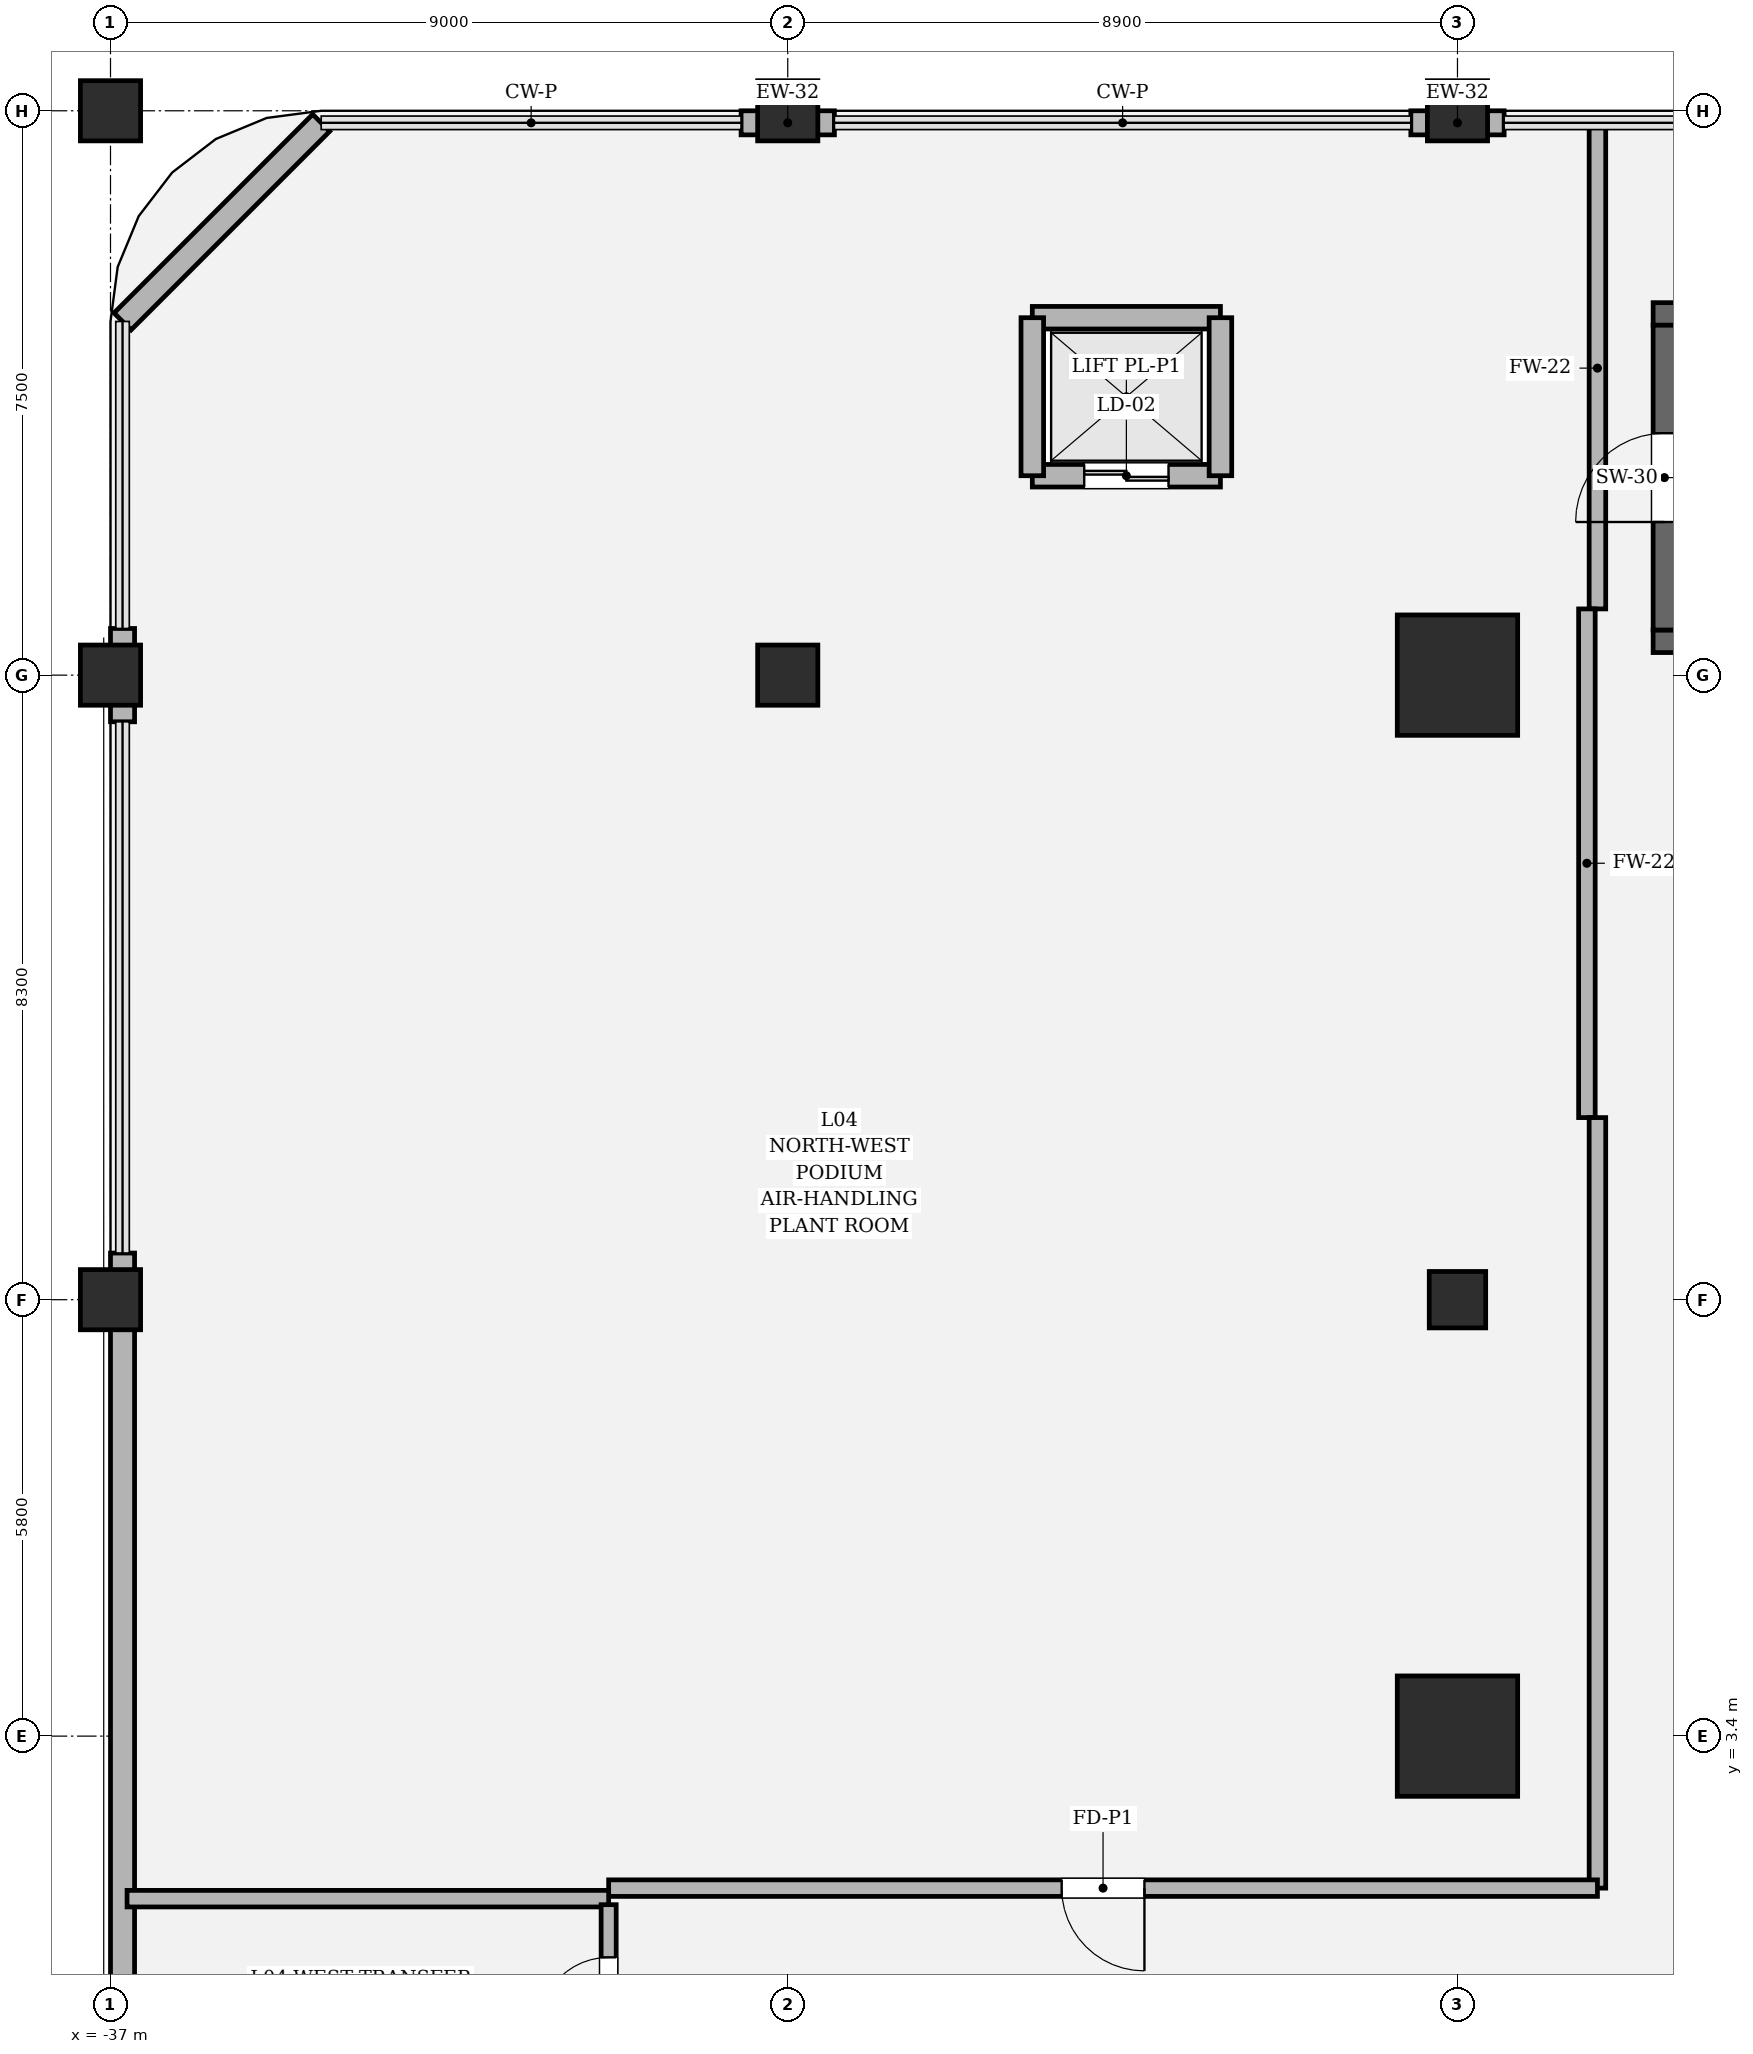
"""IFC4 building model, lengths in metres.
Left out: names, types, materials, properties, quantities, classifications, styles, units other than length and angle.
Written with IfcOpenShell. Run it as: python <this file> out.ifc"""

import sys

from ifc_helpers import new_model, si_unit, direction, frame, frame_2d, origin, origin_2d, place, context, subcontext, project, spatial, rectangle, hollow_rectangle, circle, extrude, element, fill, save


model = new_model("IFC4")
c1 = context("Model", 3, precision=1e-05, world=origin(), true_north=direction((0.0, 1.0)))
c2 = subcontext(c1, "Body", "Model", "MODEL_VIEW")
j1 = project(units=[si_unit("LENGTHUNIT", "METRE"), si_unit("PLANEANGLEUNIT", "RADIAN")], contexts=[c1])
p1 = place(None, origin())
s1 = spatial("IfcSite", under=j1, at=p1, CompositionType="ELEMENT")
p2 = place(p1, origin())
s2 = spatial("IfcBuilding", under=s1, at=p2, CompositionType="ELEMENT")
p3 = place(p2, frame((0.0, 0.0, 22.2)))
s3 = spatial("IfcBuildingStorey", under=s2, at=p3, CompositionType="ELEMENT", Elevation=22.2)
for number, where, z_axis, x_axis in (
    (1, (-16.5, 17.95, 0.0), (0.0, 0.0, 1.0), (1.0, 0.0, 0.0)),
    (2, (-6.1, 22.3, 0.0), (0.0, 0.0, 1.0), (-1.0, 0.0, 0.0)),
):
    element("IfcWall", number, at=place(p3, frame(where, z_axis=z_axis, x_axis=x_axis)), inside=s3, PredefinedType="SOLIDWALL", context=c2, shape_type="SweptSolid", body=[
        extrude(rectangle(XDim=10.4, YDim=0.3, at=frame_2d((5.2, 0.0))), origin(), (0.0, 0.0, 1.0), 6.0),
    ])
p4 = place(p3, frame((-16.35, 18.1, 0.0), z_axis=(0.0, 0.0, 1.0), x_axis=(0.0, 1.0, 0.0)))
e3 = element("IfcWall", 3, at=p4, inside=s3, PredefinedType="SOLIDWALL", context=c2, shape_type="SweptSolid", body=[
    extrude(rectangle(XDim=4.05, YDim=0.3, at=frame_2d((2.025, 0.0))), origin(), (0.0, 0.0, 1.0), 6.0),
])
p5 = place(p4, frame((1.435, 0.0, 0.0)))
e4 = element("IfcOpeningElement", 4, at=p5, cuts=e3, PredefinedType="OPENING", context=c2, shape_type="SweptSolid", body=[
    extrude(rectangle(XDim=1.18, YDim=2.2, at=frame_2d((0.59, 1.1))), frame((0.0, 0.16, 0.0), z_axis=(0.0, -1.0, 0.0), x_axis=(1.0, 0.0, 0.0)), (0.0, 0.0, 1.0), 0.32),
])
for number, where, z_axis, x_axis in (
    (5, (-19.1, 17.5, 0.0), (0.0, 0.0, 1.0), (1.0, 0.0, 0.0)),
    (6, (-19.1, 3.4, 0.0), (0.0, 0.0, 1.0), (1.0, 0.0, 0.0)),
):
    element("IfcColumn", number, at=place(p3, frame(where, z_axis=z_axis, x_axis=x_axis)), inside=s3, PredefinedType="COLUMN", context=c2, shape_type="SweptSolid", body=[
        extrude(hollow_rectangle(XDim=1.6, YDim=1.6, WallThickness=0.05, at=origin_2d()), origin(), (0.0, 0.0, 1.0), 6.0),
    ])
for number, where, z_axis, x_axis in (
    (7, (-37.0, 9.2, 0.0), (0.0, 0.0, 1.0), (1.0, 0.0, 0.0)),
    (8, (-37.0, 17.5, 0.0), (0.0, 0.0, 1.0), (1.0, 0.0, 0.0)),
    (9, (-28.0, 17.5, 0.0), (0.0, 0.0, 1.0), (1.0, 0.0, 0.0)),
    (10, (-37.0, 25.0, 0.0), (0.0, 0.0, 1.0), (1.0, 0.0, 0.0)),
    (11, (-28.0, 25.0, 0.0), (0.0, 0.0, 1.0), (1.0, 0.0, 0.0)),
    (12, (-19.1, 25.0, 0.0), (0.0, 0.0, 1.0), (1.0, 0.0, 0.0)),
):
    element("IfcColumn", number, at=place(p3, frame(where, z_axis=z_axis, x_axis=x_axis)), inside=s3, PredefinedType="COLUMN", context=c2, shape_type="SweptSolid", body=[
        extrude(rectangle(XDim=0.8, YDim=0.8, at=origin_2d()), origin(), (0.0, 0.0, 1.0), 6.0),
    ])
p6 = place(p3, frame((-19.1, 9.2, 0.0), z_axis=(0.0, 0.0, 1.0), x_axis=(1.0, 0.0, 0.0)))
e13 = element("IfcColumn", 13, at=p6, inside=s3, PredefinedType="PILASTER", context=c2, shape_type="SweptSolid", body=[
    extrude(circle(Radius=0.375, at=origin_2d()), origin(), (0.0, 0.0, 1.0), 6.0),
])
p7 = place(p3, frame((-27.38, 24.84, 0.0), z_axis=(0.0, 0.0, 1.0), x_axis=(-1.0, 0.0, 0.0)))
e14 = element("IfcWall", 14, at=p7, inside=s3, PredefinedType="SOLIDWALL", context=c2, shape_type="SweptSolid", body=[
    extrude(rectangle(XDim=1.24, YDim=0.32, at=frame_2d((0.62, 0.0))), origin(), (0.0, 0.0, 1.0), 3.864),
])
p8 = place(p3, frame((-18.48, 24.84, 0.0), z_axis=(0.0, 0.0, 1.0), x_axis=(-1.0, 0.0, 0.0)))
e15 = element("IfcWall", 15, at=p8, inside=s3, PredefinedType="SOLIDWALL", context=c2, shape_type="SweptSolid", body=[
    extrude(rectangle(XDim=1.24, YDim=0.32, at=frame_2d((0.62, 0.0))), origin(), (0.0, 0.0, 1.0), 3.864),
])
p9 = place(p3, frame((-36.84, -9.82, 0.0), z_axis=(0.0, 0.0, 1.0), x_axis=(0.0, 1.0, 0.0)))
e16 = element("IfcWall", 16, at=p9, inside=s3, PredefinedType="SOLIDWALL", context=c2, shape_type="SweptSolid", body=[
    extrude(rectangle(XDim=19.64, YDim=0.32, at=frame_2d((9.82, 0.0))), origin(), (0.0, 0.0, 1.0), 3.864),
])
p10 = place(p3, frame((-36.84, 16.88, 0.0), z_axis=(0.0, 0.0, 1.0), x_axis=(0.0, 1.0, 0.0)))
e17 = element("IfcWall", 17, at=p10, inside=s3, PredefinedType="SOLIDWALL", context=c2, shape_type="SweptSolid", body=[
    extrude(rectangle(XDim=1.24, YDim=0.32, at=frame_2d((0.62, 0.0))), origin(), (0.0, 0.0, 1.0), 3.864),
])
p11 = place(p3, frame((-36.84, 22.2, 0.0), z_axis=(0.0, 0.0, 1.0), x_axis=(0.707106781187, 0.707106781187, 0.0)))
e18 = element("IfcWall", 18, at=p11, inside=s3, PredefinedType="SOLIDWALL", context=c2, shape_type="SweptSolid", body=[
    extrude(rectangle(XDim=3.734, YDim=0.32, at=frame_2d((1.867, 0.0))), origin(), (0.0, 0.0, 1.0), 3.864),
])
p12 = place(p3, frame((-24.75, 20.15, 0.0), z_axis=(0.0, 0.0, 1.0), x_axis=(1.0, 0.0, 0.0)))
e19 = element("IfcWall", 19, at=p12, inside=s3, PredefinedType="SOLIDWALL", context=c2, shape_type="SweptSolid", body=[
    extrude(rectangle(XDim=2.5, YDim=0.3, at=frame_2d((1.25, 0.0))), origin(), (0.0, 0.0, 1.0), 5.72),
])
p13 = place(p12, frame((0.69, 0.0, 0.0)))
e20 = element("IfcOpeningElement", 20, at=p13, cuts=e19, PredefinedType="OPENING", context=c2, shape_type="SweptSolid", body=[
    extrude(rectangle(XDim=1.12, YDim=2.25, at=frame_2d((0.56, 1.125))), frame((0.0, 0.16, 0.0), z_axis=(0.0, -1.0, 0.0), x_axis=(1.0, 0.0, 0.0)), (0.0, 0.0, 1.0), 0.32),
])
p14 = place(p3, frame((-24.75, 22.25, 0.0), z_axis=(0.0, 0.0, 1.0), x_axis=(1.0, 0.0, 0.0)))
e21 = element("IfcWall", 21, at=p14, inside=s3, PredefinedType="SOLIDWALL", context=c2, shape_type="SweptSolid", body=[
    extrude(rectangle(XDim=2.5, YDim=0.3, at=frame_2d((1.25, 0.0))), origin(), (0.0, 0.0, 1.0), 5.72),
])
for number, where, z_axis, x_axis in (
    (22, (-24.75, 20.15, 0.0), (0.0, 0.0, 1.0), (0.0, 1.0, 0.0)),
    (23, (-22.25, 20.15, 0.0), (0.0, 0.0, 1.0), (0.0, 1.0, 0.0)),
):
    element("IfcWall", number, at=place(p3, frame(where, z_axis=z_axis, x_axis=x_axis)), inside=s3, PredefinedType="SOLIDWALL", context=c2, shape_type="SweptSolid", body=[
        extrude(rectangle(XDim=2.1, YDim=0.3, at=frame_2d((1.05, 0.0))), origin(), (0.0, 0.0, 1.0), 5.72),
    ])
p15 = place(p3, frame((-17.24, 24.78, 0.0), z_axis=(0.0, 0.0, 1.0), x_axis=(0.0, -1.0, 0.0)))
e24 = element("IfcWall", 24, at=p15, inside=s3, PredefinedType="SOLIDWALL", context=c2, shape_type="SweptSolid", body=[
    extrude(rectangle(XDim=6.4, YDim=0.22, at=frame_2d((3.2, 0.0))), origin(), (0.0, 0.0, 1.0), 5.72),
])
p16 = place(p3, frame((-17.38, 18.38, 0.0), z_axis=(0.0, 0.0, 1.0), x_axis=(0.0, -1.0, 0.0)))
e25 = element("IfcWall", 25, at=p16, inside=s3, PredefinedType="SOLIDWALL", context=c2, shape_type="SweptSolid", body=[
    extrude(rectangle(XDim=6.76, YDim=0.22, at=frame_2d((3.38, 0.0))), origin(), (0.0, 0.0, 1.0), 4.394),
])
p17 = place(p3, frame((-17.24, 11.62, 0.0), z_axis=(0.0, 0.0, 1.0), x_axis=(0.0, -1.0, 0.0)))
e26 = element("IfcWall", 26, at=p17, inside=s3, PredefinedType="SOLIDWALL", context=c2, shape_type="SweptSolid", body=[
    extrude(rectangle(XDim=10.24, YDim=0.22, at=frame_2d((5.12, 0.0))), origin(), (0.0, 0.0, 1.0), 4.394),
])
p18 = place(p3, frame((-17.24, 1.38, 0.0), z_axis=(0.0, 0.0, 1.0), x_axis=(-1.0, 0.0, 0.0)))
e27 = element("IfcWall", 27, at=p18, inside=s3, PredefinedType="SOLIDWALL", context=c2, shape_type="SweptSolid", body=[
    extrude(rectangle(XDim=13.14, YDim=0.22, at=frame_2d((6.57, 0.0))), origin(), (0.0, 0.0, 1.0), 4.394),
])
p19 = place(p18, frame((6.02, 0.0, 0.0)))
e28 = element("IfcOpeningElement", 28, at=p19, cuts=e27, PredefinedType="OPENING", context=c2, shape_type="SweptSolid", body=[
    extrude(rectangle(XDim=1.1, YDim=2.2, at=frame_2d((0.55, 1.1))), frame((0.0, 0.12, 0.0), z_axis=(0.0, -1.0, 0.0), x_axis=(1.0, 0.0, 0.0)), (0.0, 0.0, 1.0), 0.24),
])
p20 = place(p3, frame((-30.38, 1.24, 0.0), z_axis=(0.0, 0.0, 1.0), x_axis=(-1.0, 0.0, 0.0)))
e29 = element("IfcWall", 29, at=p20, inside=s3, PredefinedType="SOLIDWALL", context=c2, shape_type="SweptSolid", body=[
    extrude(rectangle(XDim=6.4, YDim=0.22, at=frame_2d((3.2, 0.0))), origin(), (0.0, 0.0, 1.0), 5.72),
])
p21 = place(p3, frame((-30.38, 1.16, 0.0), z_axis=(0.0, 0.0, 1.0), x_axis=(0.0, -1.0, 0.0)))
e30 = element("IfcWall", 30, at=p21, inside=s3, PredefinedType="SOLIDWALL", context=c2, shape_type="SweptSolid", body=[
    extrude(rectangle(XDim=2.32, YDim=0.2, at=frame_2d((1.16, 0.0))), origin(), (0.0, 0.0, 1.0), 5.72),
])
p22 = place(p21, frame((0.7, 0.0, 0.0)))
e31 = element("IfcOpeningElement", 31, at=p22, cuts=e30, PredefinedType="OPENING", context=c2, shape_type="SweptSolid", body=[
    extrude(rectangle(XDim=0.92, YDim=2.1, at=frame_2d((0.46, 1.05))), frame((0.0, 0.11, 0.0), z_axis=(0.0, -1.0, 0.0), x_axis=(1.0, 0.0, 0.0)), (0.0, 0.0, 1.0), 0.22),
])
p23 = place(p5, origin())
e32 = element("IfcDoor", 32, at=p23, inside=s3, OperationType="SINGLE_SWING_LEFT", PredefinedType="DOOR", context=c2, shape_type="SweptSolid", body=[
    extrude(rectangle(XDim=1.18, YDim=2.2, at=frame_2d((0.59, 1.1))), frame((0.0, 0.025, 0.0), z_axis=(0.0, -1.0, 0.0), x_axis=(1.0, 0.0, 0.0)), (0.0, 0.0, 1.0), 0.05),
])
fill(e4, e32)
p24 = place(p13, origin())
e33 = element("IfcDoor", 33, at=p24, inside=s3, OperationType="DOUBLE_DOOR_SLIDING", PredefinedType="DOOR", context=c2, shape_type="SweptSolid", body=[
    extrude(rectangle(XDim=1.12, YDim=2.25, at=frame_2d((0.56, 1.125))), frame((0.0, 0.025, 0.0), z_axis=(0.0, -1.0, 0.0), x_axis=(1.0, 0.0, 0.0)), (0.0, 0.0, 1.0), 0.05),
])
fill(e20, e33)
p25 = place(p19, origin())
e34 = element("IfcDoor", 34, at=p25, inside=s3, OperationType="SINGLE_SWING_LEFT", PredefinedType="DOOR", context=c2, shape_type="SweptSolid", body=[
    extrude(rectangle(XDim=1.1, YDim=2.2, at=frame_2d((0.55, 1.1))), frame((0.0, 0.025, 0.0), z_axis=(0.0, -1.0, 0.0), x_axis=(1.0, 0.0, 0.0)), (0.0, 0.0, 1.0), 0.05),
])
fill(e28, e34)
p26 = place(p22, origin())
e35 = element("IfcDoor", 35, at=p26, inside=s3, OperationType="SINGLE_SWING_RIGHT", PredefinedType="DOOR", context=c2, shape_type="SweptSolid", body=[
    extrude(rectangle(XDim=0.92, YDim=2.1, at=frame_2d((0.46, 1.05))), frame((0.0, 0.025, 0.0), z_axis=(0.0, -1.0, 0.0), x_axis=(1.0, 0.0, 0.0)), (0.0, 0.0, 1.0), 0.05),
])
fill(e31, e35)
save(model, sys.argv[1])
